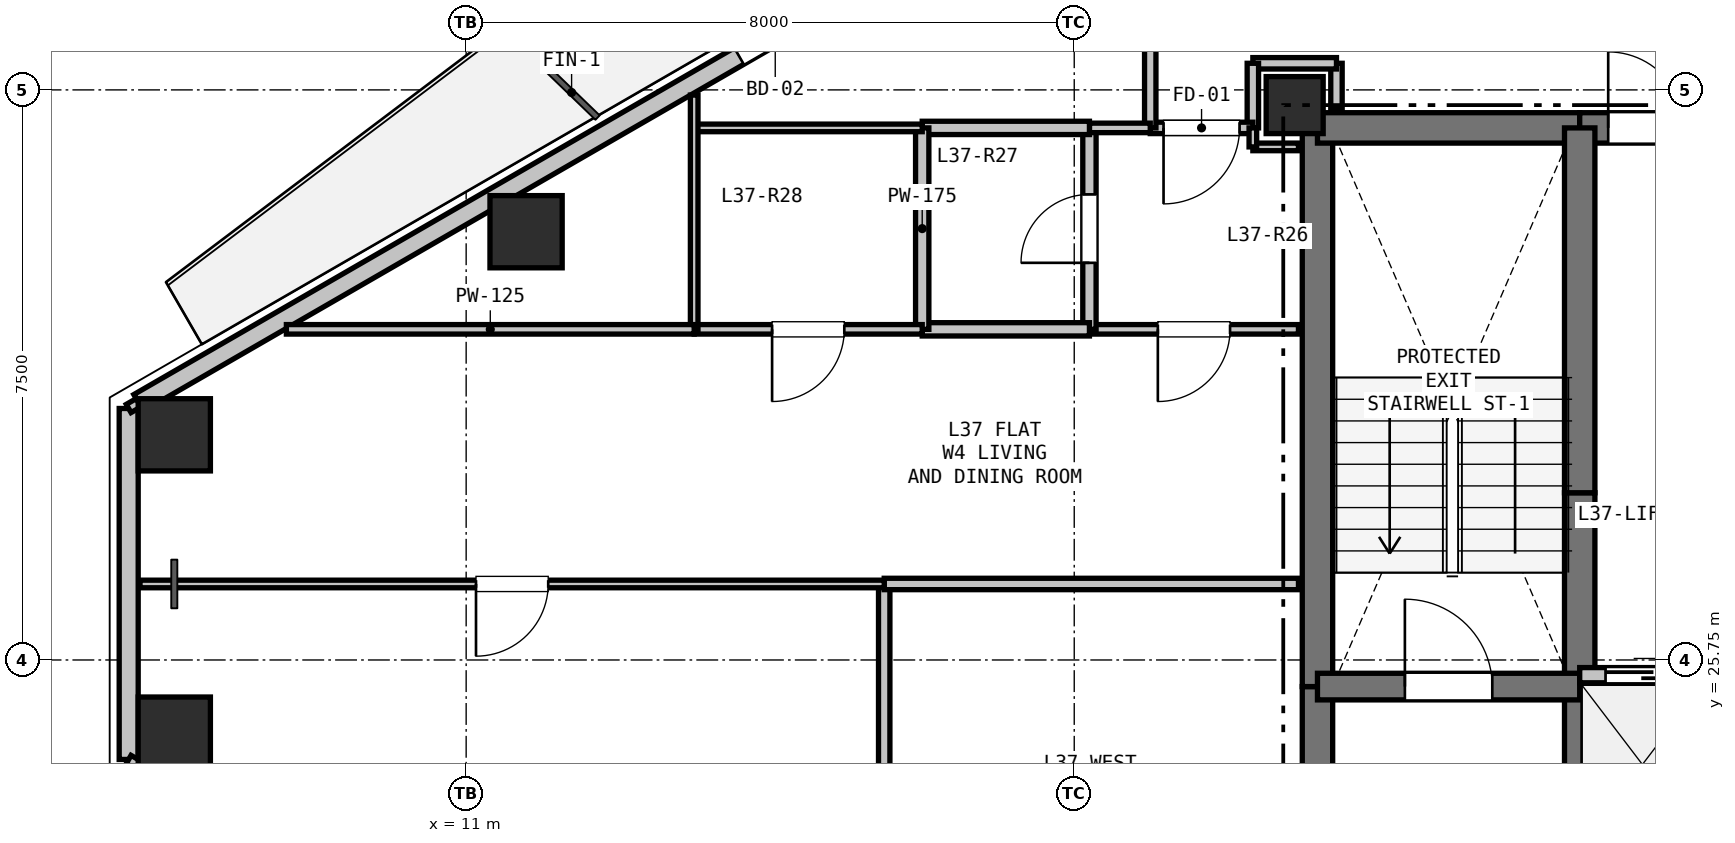
"""IFC4 building model, lengths in metres.
Left out: names, types, materials, properties, quantities, classifications, styles, units other than length and angle.
Written with IfcOpenShell. Run it as: python <this file> out.ifc"""

import sys

from ifc_helpers import new_model, si_unit, direction, frame, frame_2d, origin, origin_2d, place, context, subcontext, project, spatial, rectangle, hollow_rectangle, extrude, element, fill, save


model = new_model("IFC4")
c1 = context("Model", 3, precision=1e-05, world=origin(), true_north=direction((0.0, 1.0)))
c2 = subcontext(c1, "Body", "Model", "MODEL_VIEW")
j1 = project(units=[si_unit("LENGTHUNIT", "METRE"), si_unit("PLANEANGLEUNIT", "RADIAN")], contexts=[c1])
p1 = place(None, origin())
s1 = spatial("IfcSite", under=j1, at=p1, CompositionType="ELEMENT")
p2 = place(p1, origin())
s2 = spatial("IfcBuilding", under=s1, at=p2, CompositionType="ELEMENT")
p3 = place(p2, frame((0.0, 0.0, 134.4)))
s3 = spatial("IfcBuildingStorey", under=s2, at=p3, CompositionType="ELEMENT", Elevation=134.4)
p4 = place(p3, frame((21.9, 33.05, 0.0), z_axis=(0.0, 0.0, 1.0), x_axis=(1.0, 0.0, 0.0)))
e1 = element("IfcColumn", 1, at=p4, inside=s3, PredefinedType="COLUMN", context=c2, shape_type="SweptSolid", body=[
    extrude(rectangle(XDim=0.75, YDim=0.75, at=origin_2d()), origin(), (0.0, 0.0, 1.0), 3.3),
])
for number, where, z_axis, x_axis in (
    (2, (7.16, 28.712, 0.0), (0.0, 0.0, 1.0), (1.0, 0.0, 0.0)),
    (3, (11.788, 31.384, 0.0), (0.0, 0.0, 1.0), (1.0, 0.0, 0.0)),
    (4, (7.16, 24.788, 0.0), (0.0, 0.0, 1.0), (1.0, 0.0, 0.0)),
):
    element("IfcColumn", number, at=place(p3, frame(where, z_axis=z_axis, x_axis=x_axis)), inside=s3, PredefinedType="COLUMN", context=c2, shape_type="SweptSolid", body=[
        extrude(hollow_rectangle(XDim=0.95, YDim=0.95, WallThickness=0.028, at=origin_2d()), origin(), (0.0, 0.0, 1.0), 3.3),
    ])
p5 = place(p3, frame((6.56, 24.441, 0.0), z_axis=(0.0, 0.0, 1.0), x_axis=(0.0, 1.0, 0.0)))
e5 = element("IfcWall", 5, at=p5, inside=s3, PredefinedType="SOLIDWALL", context=c2, shape_type="SweptSolid", body=[
    extrude(rectangle(XDim=4.617, YDim=0.25, at=frame_2d((2.309, 0.0))), origin(), (0.0, 0.0, 1.0), 2.68),
])
p6 = place(p3, frame((6.69, 29.134, 0.0), z_axis=(0.0, 0.0, 1.0), x_axis=(0.866027848477, 0.499995765644, 0.0)))
e6 = element("IfcWall", 6, at=p6, inside=s3, PredefinedType="SOLIDWALL", context=c2, shape_type="SweptSolid", body=[
    extrude(rectangle(XDim=11.186, YDim=0.25, at=frame_2d((5.593, 0.0))), origin(), (0.0, 0.0, 1.0), 2.68),
])
p7 = place(p6, frame((9.122, 0.0, 0.0)))
e7 = element("IfcOpeningElement", 7, at=p7, cuts=e6, PredefinedType="OPENING", context=c2, shape_type="SweptSolid", body=[
    extrude(rectangle(XDim=1.1, YDim=2.1, at=frame_2d((0.55, 1.05))), frame((0.0, 0.135, 0.0), z_axis=(0.0, -1.0, 0.0), x_axis=(1.0, 0.0, 0.0)), (0.0, 0.0, 1.0), 0.27),
])
p8 = place(p3, frame((16.378, 18.773, 0.0), z_axis=(0.0, 0.0, 1.0), x_axis=(-0.866027848477, 0.499995765644, 0.0)))
e8 = element("IfcWall", 8, at=p8, inside=s3, PredefinedType="SOLIDWALL", context=c2, shape_type="SweptSolid", body=[
    extrude(rectangle(XDim=11.186, YDim=0.25, at=frame_2d((5.593, 0.0))), origin(), (0.0, 0.0, 1.0), 2.68),
])
p9 = place(p8, frame((6.605, 0.0, 0.9)))
e9 = element("IfcOpeningElement", 9, at=p9, cuts=e8, PredefinedType="OPENING", context=c2, shape_type="SweptSolid", body=[
    extrude(rectangle(XDim=1.2, YDim=1.4, at=frame_2d((0.6, 0.7))), frame((0.0, 0.135, 0.0), z_axis=(0.0, -1.0, 0.0), x_axis=(1.0, 0.0, 0.0)), (0.0, 0.0, 1.0), 0.27),
])
p10 = place(p3, frame((22.2, 20.75, 0.0), z_axis=(0.0, 0.0, 1.0), x_axis=(0.0, 1.0, 0.0)))
e10 = element("IfcWall", 10, at=p10, inside=s3, PredefinedType="SHEAR", context=c2, shape_type="SweptSolid", body=[
    extrude(rectangle(XDim=4.65, YDim=0.4, at=frame_2d((2.325, 0.0))), origin(), (0.0, 0.0, 1.0), 3.06),
])
p11 = place(p3, frame((22.2, 25.4, 0.0), z_axis=(0.0, 0.0, 1.0), x_axis=(0.0, 1.0, 0.0)))
e11 = element("IfcWall", 11, at=p11, inside=s3, PredefinedType="SHEAR", context=c2, shape_type="SweptSolid", body=[
    extrude(rectangle(XDim=7.35, YDim=0.4, at=frame_2d((3.675, 0.0))), origin(), (0.0, 0.0, 1.0), 3.06),
])
p12 = place(p3, frame((22.2, 32.75, 0.0), z_axis=(0.0, 0.0, 1.0), x_axis=(1.0, 0.0, 0.0)))
e12 = element("IfcWall", 12, at=p12, inside=s3, PredefinedType="SHEAR", context=c2, shape_type="SweptSolid", body=[
    extrude(rectangle(XDim=3.45, YDim=0.4, at=frame_2d((1.725, 0.0))), origin(), (0.0, 0.0, 1.0), 3.06),
])
p13 = place(p3, frame((25.65, 32.75, 0.0), z_axis=(0.0, 0.0, 1.0), x_axis=(1.0, 0.0, 0.0)))
e13 = element("IfcWall", 13, at=p13, inside=s3, PredefinedType="SHEAR", context=c2, shape_type="SweptSolid", body=[
    extrude(rectangle(XDim=1.75, YDim=0.4, at=frame_2d((0.875, 0.0))), origin(), (0.0, 0.0, 1.0), 3.06),
])
p14 = place(p13, frame((0.375, 0.0, 0.0)))
e14 = element("IfcOpeningElement", 14, at=p14, cuts=e13, PredefinedType="OPENING", context=c2, shape_type="SweptSolid", body=[
    extrude(rectangle(XDim=1.0, YDim=2.15, at=frame_2d((0.5, 1.075))), frame((0.0, 0.21, 0.0), z_axis=(0.0, -1.0, 0.0), x_axis=(1.0, 0.0, 0.0)), (0.0, 0.0, 1.0), 0.42),
])
p15 = place(p3, frame((25.65, 22.75, 0.0), z_axis=(0.0, 0.0, 1.0), x_axis=(0.0, 1.0, 0.0)))
e15 = element("IfcWall", 15, at=p15, inside=s3, PredefinedType="SHEAR", context=c2, shape_type="SweptSolid", body=[
    extrude(rectangle(XDim=2.8, YDim=0.4, at=frame_2d((1.4, 0.0))), origin(), (0.0, 0.0, 1.0), 3.06),
])
p16 = place(p3, frame((25.65, 25.55, 0.0), z_axis=(0.0, 0.0, 1.0), x_axis=(0.0, 1.0, 0.0)))
e16 = element("IfcWall", 16, at=p16, inside=s3, PredefinedType="SHEAR", context=c2, shape_type="SweptSolid", body=[
    extrude(rectangle(XDim=2.4, YDim=0.4, at=frame_2d((1.2, 0.0))), origin(), (0.0, 0.0, 1.0), 3.06),
])
p17 = place(p3, frame((25.65, 27.95, 0.0), z_axis=(0.0, 0.0, 1.0), x_axis=(0.0, 1.0, 0.0)))
e17 = element("IfcWall", 17, at=p17, inside=s3, PredefinedType="SHEAR", context=c2, shape_type="SweptSolid", body=[
    extrude(rectangle(XDim=4.8, YDim=0.4, at=frame_2d((2.4, 0.0))), origin(), (0.0, 0.0, 1.0), 3.06),
])
p18 = place(p3, frame((22.2, 25.4, 0.0), z_axis=(0.0, 0.0, 1.0), x_axis=(1.0, 0.0, 0.0)))
e18 = element("IfcWall", 18, at=p18, inside=s3, PredefinedType="SHEAR", context=c2, shape_type="SweptSolid", body=[
    extrude(rectangle(XDim=3.45, YDim=0.35, at=frame_2d((1.725, 0.0))), origin(), (0.0, 0.0, 1.0), 3.06),
])
p19 = place(p18, frame((1.15, 0.0, 0.0)))
e19 = element("IfcOpeningElement", 19, at=p19, cuts=e18, PredefinedType="OPENING", context=c2, shape_type="SweptSolid", body=[
    extrude(rectangle(XDim=1.15, YDim=2.15, at=frame_2d((0.575, 1.075))), frame((0.0, 0.185, 0.0), z_axis=(0.0, -1.0, 0.0), x_axis=(1.0, 0.0, 0.0)), (0.0, 0.0, 1.0), 0.37),
])
p20 = place(p3, frame((25.65, 25.55, 0.0), z_axis=(0.0, 0.0, 1.0), x_axis=(1.0, 0.0, 0.0)))
e20 = element("IfcWall", 20, at=p20, inside=s3, PredefinedType="PARTITIONING", context=c2, shape_type="SweptSolid", body=[
    extrude(rectangle(XDim=4.95, YDim=0.2, at=frame_2d((2.475, 0.0))), origin(), (0.0, 0.0, 1.0), 3.06),
])
p21 = place(p20, frame((0.34, 0.0, 0.0)))
e21 = element("IfcOpeningElement", 21, at=p21, cuts=e20, PredefinedType="OPENING", context=c2, shape_type="SweptSolid", body=[
    extrude(rectangle(XDim=1.1, YDim=2.15, at=frame_2d((0.55, 1.075))), frame((0.0, 0.11, 0.0), z_axis=(0.0, -1.0, 0.0), x_axis=(1.0, 0.0, 0.0)), (0.0, 0.0, 1.0), 0.22),
])
p22 = place(p20, frame((1.99, 0.0, 0.0)))
e22 = element("IfcOpeningElement", 22, at=p22, cuts=e20, PredefinedType="OPENING", context=c2, shape_type="SweptSolid", body=[
    extrude(rectangle(XDim=1.1, YDim=2.15, at=frame_2d((0.55, 1.075))), frame((0.0, 0.11, 0.0), z_axis=(0.0, -1.0, 0.0), x_axis=(1.0, 0.0, 0.0)), (0.0, 0.0, 1.0), 0.22),
])
p23 = place(p20, frame((3.64, 0.0, 0.0)))
e23 = element("IfcOpeningElement", 23, at=p23, cuts=e20, PredefinedType="OPENING", context=c2, shape_type="SweptSolid", body=[
    extrude(rectangle(XDim=1.1, YDim=2.15, at=frame_2d((0.55, 1.075))), frame((0.0, 0.11, 0.0), z_axis=(0.0, -1.0, 0.0), x_axis=(1.0, 0.0, 0.0)), (0.0, 0.0, 1.0), 0.22),
])
p24 = place(p3, frame((22.45, 33.0, 0.0), z_axis=(0.0, 0.0, 1.0), x_axis=(0.0, 1.0, 0.0)))
e24 = element("IfcWall", 24, at=p24, inside=s3, PredefinedType="PARTITIONING", context=c2, shape_type="SweptSolid", body=[
    extrude(rectangle(XDim=0.6, YDim=0.15, at=frame_2d((0.3, 0.0))), origin(), (0.0, 0.0, 1.0), 2.508),
])
p25 = place(p3, frame((22.45, 33.6, 0.0), z_axis=(0.0, 0.0, 1.0), x_axis=(-1.0, 0.0, 0.0)))
e25 = element("IfcWall", 25, at=p25, inside=s3, PredefinedType="PARTITIONING", context=c2, shape_type="SweptSolid", body=[
    extrude(rectangle(XDim=1.1, YDim=0.15, at=frame_2d((0.55, 0.0))), origin(), (0.0, 0.0, 1.0), 3.06),
])
p26 = place(p3, frame((21.35, 33.6, 0.0), z_axis=(0.0, 0.0, 1.0), x_axis=(0.0, -1.0, 0.0)))
e26 = element("IfcWall", 26, at=p26, inside=s3, PredefinedType="PARTITIONING", context=c2, shape_type="SweptSolid", body=[
    extrude(rectangle(XDim=0.85, YDim=0.15, at=frame_2d((0.425, 0.0))), origin(), (0.0, 0.0, 1.0), 2.433),
])
p27 = place(p3, frame((21.35, 32.75, 0.0), z_axis=(0.0, 0.0, 1.0), x_axis=(-1.0, 0.0, 0.0)))
e27 = element("IfcWall", 27, at=p27, inside=s3, PredefinedType="PARTITIONING", context=c2, shape_type="SweptSolid", body=[
    extrude(rectangle(XDim=1.35, YDim=0.15, at=frame_2d((0.675, 0.0))), origin(), (0.0, 0.0, 1.0), 2.433),
])
p28 = place(p27, frame((0.175, 0.0, 0.0)))
e28 = element("IfcOpeningElement", 28, at=p28, cuts=e27, PredefinedType="OPENING", context=c2, shape_type="SweptSolid", body=[
    extrude(rectangle(XDim=1.0, YDim=2.15, at=frame_2d((0.5, 1.075))), frame((0.0, 0.085, 0.0), z_axis=(0.0, -1.0, 0.0), x_axis=(1.0, 0.0, 0.0)), (0.0, 0.0, 1.0), 0.17),
])
p29 = place(p3, frame((20.0, 32.75, 0.0), z_axis=(0.0, 0.0, 1.0), x_axis=(0.0, 1.0, 0.0)))
e29 = element("IfcWall", 29, at=p29, inside=s3, PredefinedType="PARTITIONING", context=c2, shape_type="SweptSolid", body=[
    extrude(rectangle(XDim=2.6, YDim=0.15, at=frame_2d((1.3, 0.0))), origin(), (0.0, 0.0, 1.0), 2.433),
])
p30 = place(p3, frame((21.35, 32.5, 0.0), z_axis=(0.0, 0.0, 1.0), x_axis=(1.0, 0.0, 0.0)))
e30 = element("IfcWall", 30, at=p30, inside=s3, PredefinedType="PARTITIONING", context=c2, shape_type="SweptSolid", body=[
    extrude(rectangle(XDim=0.6, YDim=0.1, at=frame_2d((0.3, 0.0))), origin(), (0.0, 0.0, 1.0), 2.508),
])
p31 = place(p3, frame((21.95, 30.1, 0.0), z_axis=(0.0, 0.0, 1.0), x_axis=(-1.0, 0.0, 0.0)))
e31 = element("IfcWall", 31, at=p31, inside=s3, PredefinedType="PARTITIONING", context=c2, shape_type="SweptSolid", body=[
    extrude(rectangle(XDim=2.75, YDim=0.125, at=frame_2d((1.375, 0.0))), origin(), (0.0, 0.0, 1.0), 2.508),
])
p32 = place(p31, frame((0.9, 0.0, 0.0)))
e32 = element("IfcOpeningElement", 32, at=p32, cuts=e31, PredefinedType="OPENING", context=c2, shape_type="SweptSolid", body=[
    extrude(rectangle(XDim=0.95, YDim=2.1, at=frame_2d((0.475, 1.05))), frame((0.0, 0.073, 0.0), z_axis=(0.0, -1.0, 0.0), x_axis=(1.0, 0.0, 0.0)), (0.0, 0.0, 1.0), 0.145),
])
p33 = place(p3, frame((19.2, 30.1, 0.0), z_axis=(0.0, 0.0, 1.0), x_axis=(0.0, 1.0, 0.0)))
e33 = element("IfcWall", 33, at=p33, inside=s3, PredefinedType="PLUMBINGWALL", context=c2, shape_type="SweptSolid", body=[
    extrude(rectangle(XDim=2.65, YDim=0.175, at=frame_2d((1.325, 0.0))), origin(), (0.0, 0.0, 1.0), 2.433),
])
p34 = place(p33, frame((0.875, 0.0, 0.0)))
e34 = element("IfcOpeningElement", 34, at=p34, cuts=e33, PredefinedType="OPENING", context=c2, shape_type="SweptSolid", body=[
    extrude(rectangle(XDim=0.9, YDim=2.1, at=frame_2d((0.45, 1.05))), frame((0.0, 0.097, 0.0), z_axis=(0.0, -1.0, 0.0), x_axis=(1.0, 0.0, 0.0)), (0.0, 0.0, 1.0), 0.195),
])
p35 = place(p3, frame((19.2, 32.75, 0.0), z_axis=(0.0, 0.0, 1.0), x_axis=(1.0, 0.0, 0.0)))
e35 = element("IfcWall", 35, at=p35, inside=s3, PredefinedType="PARTITIONING", context=c2, shape_type="SweptSolid", body=[
    extrude(rectangle(XDim=0.8, YDim=0.125, at=frame_2d((0.4, 0.0))), origin(), (0.0, 0.0, 1.0), 2.433),
])
p36 = place(p3, frame((21.35, 32.75, 0.0), z_axis=(0.0, 0.0, 1.0), x_axis=(0.0, -1.0, 0.0)))
e36 = element("IfcWall", 36, at=p36, inside=s3, PredefinedType="PARTITIONING", context=c2, shape_type="SweptSolid", body=[
    extrude(rectangle(XDim=0.25, YDim=0.1, at=frame_2d((0.125, 0.0))), origin(), (0.0, 0.0, 1.0), 3.06),
])
p37 = place(p3, frame((17.0, 32.75, 0.0), z_axis=(0.0, 0.0, 1.0), x_axis=(1.0, 0.0, 0.0)))
e37 = element("IfcWall", 37, at=p37, inside=s3, PredefinedType="PLUMBINGWALL", context=c2, shape_type="SweptSolid", body=[
    extrude(rectangle(XDim=2.2, YDim=0.175, at=frame_2d((1.1, 0.0))), origin(), (0.0, 0.0, 1.0), 2.433),
])
p38 = place(p3, frame((19.2, 30.1, 0.0), z_axis=(0.0, 0.0, 1.0), x_axis=(-1.0, 0.0, 0.0)))
e38 = element("IfcWall", 38, at=p38, inside=s3, PredefinedType="PLUMBINGWALL", context=c2, shape_type="SweptSolid", body=[
    extrude(rectangle(XDim=2.2, YDim=0.175, at=frame_2d((1.1, 0.0))), origin(), (0.0, 0.0, 1.0), 3.06),
])
p39 = place(p3, frame((17.0, 30.1, 0.0), z_axis=(0.0, 0.0, 1.0), x_axis=(0.0, 1.0, 0.0)))
e39 = element("IfcWall", 39, at=p39, inside=s3, PredefinedType="PLUMBINGWALL", context=c2, shape_type="SweptSolid", body=[
    extrude(rectangle(XDim=2.65, YDim=0.175, at=frame_2d((1.325, 0.0))), origin(), (0.0, 0.0, 1.0), 2.433),
])
p40 = place(p3, frame((14.0, 32.75, 0.0), z_axis=(0.0, 0.0, 1.0), x_axis=(1.0, 0.0, 0.0)))
e40 = element("IfcWall", 40, at=p40, inside=s3, PredefinedType="PARTITIONING", context=c2, shape_type="SweptSolid", body=[
    extrude(rectangle(XDim=3.0, YDim=0.1, at=frame_2d((1.5, 0.0))), origin(), (0.0, 0.0, 1.0), 2.365),
])
p41 = place(p3, frame((17.0, 30.1, 0.0), z_axis=(0.0, 0.0, 1.0), x_axis=(-1.0, 0.0, 0.0)))
e41 = element("IfcWall", 41, at=p41, inside=s3, PredefinedType="PARTITIONING", context=c2, shape_type="SweptSolid", body=[
    extrude(rectangle(XDim=3.0, YDim=0.125, at=frame_2d((1.5, 0.0))), origin(), (0.0, 0.0, 1.0), 3.06),
])
p42 = place(p41, frame((1.025, 0.0, 0.0)))
e42 = element("IfcOpeningElement", 42, at=p42, cuts=e41, PredefinedType="OPENING", context=c2, shape_type="SweptSolid", body=[
    extrude(rectangle(XDim=0.95, YDim=2.1, at=frame_2d((0.475, 1.05))), frame((0.0, 0.073, 0.0), z_axis=(0.0, -1.0, 0.0), x_axis=(1.0, 0.0, 0.0)), (0.0, 0.0, 1.0), 0.145),
])
p43 = place(p3, frame((14.0, 30.1, 0.0), z_axis=(0.0, 0.0, 1.0), x_axis=(0.0, 1.0, 0.0)))
e43 = element("IfcWall", 43, at=p43, inside=s3, PredefinedType="PARTITIONING", context=c2, shape_type="SweptSolid", body=[
    extrude(rectangle(XDim=3.082, YDim=0.1, at=frame_2d((1.541, 0.0))), origin(), (0.0, 0.0, 1.0), 2.365),
])
p44 = place(p3, frame((16.5, 20.75, 0.0), z_axis=(0.0, 0.0, 1.0), x_axis=(0.0, 1.0, 0.0)))
e44 = element("IfcWall", 44, at=p44, inside=s3, PredefinedType="PARTITIONING", context=c2, shape_type="SweptSolid", body=[
    extrude(rectangle(XDim=6.0, YDim=0.15, at=frame_2d((3.0, 0.0))), origin(), (0.0, 0.0, 1.0), 2.433),
])
p45 = place(p3, frame((16.5, 26.75, 0.0), z_axis=(0.0, 0.0, 1.0), x_axis=(1.0, 0.0, 0.0)))
e45 = element("IfcWall", 45, at=p45, inside=s3, PredefinedType="PARTITIONING", context=c2, shape_type="SweptSolid", body=[
    extrude(rectangle(XDim=5.45, YDim=0.15, at=frame_2d((2.725, 0.0))), origin(), (0.0, 0.0, 1.0), 2.508),
])
p46 = place(p3, frame((8.635, 30.1, 0.0), z_axis=(0.0, 0.0, 1.0), x_axis=(1.0, 0.0, 0.0)))
e46 = element("IfcWall", 46, at=p46, inside=s3, PredefinedType="PARTITIONING", context=c2, shape_type="SweptSolid", body=[
    extrude(rectangle(XDim=5.365, YDim=0.125, at=frame_2d((2.683, 0.0))), origin(), (0.0, 0.0, 1.0), 2.725),
])
p47 = place(p3, frame((16.5, 26.75, 0.0), z_axis=(0.0, 0.0, 1.0), x_axis=(-1.0, 0.0, 0.0)))
e47 = element("IfcWall", 47, at=p47, inside=s3, PredefinedType="PARTITIONING", context=c2, shape_type="SweptSolid", body=[
    extrude(rectangle(XDim=9.791, YDim=0.1, at=frame_2d((4.896, 0.0))), origin(), (0.0, 0.0, 1.0), 2.725),
])
p48 = place(p47, frame((4.42, 0.0, 0.0)))
e48 = element("IfcOpeningElement", 48, at=p48, cuts=e47, PredefinedType="OPENING", context=c2, shape_type="SweptSolid", body=[
    extrude(rectangle(XDim=0.95, YDim=2.1, at=frame_2d((0.475, 1.05))), frame((0.0, 0.06, 0.0), z_axis=(0.0, -1.0, 0.0), x_axis=(1.0, 0.0, 0.0)), (0.0, 0.0, 1.0), 0.12),
])
for number, where, z_axis, x_axis in (
    (49, (6.56, 29.059, 0.0), (0.0, 0.0, 1.0), (0.866, 0.5, 0.0)),
    (50, (6.69, 24.366, 0.0), (0.0, 0.0, 1.0), (-0.866, 0.5, 0.0)),
):
    element("IfcWall", number, at=place(p3, frame(where, z_axis=z_axis, x_axis=x_axis)), inside=s3, PredefinedType="PARTITIONING", context=c2, shape_type="SweptSolid", body=[
        extrude(rectangle(XDim=0.15, YDim=0.125, at=frame_2d((0.075, 0.0))), origin(), (0.0, 0.0, 1.0), 3.06),
    ])
p49 = place(p7, origin())
e51 = element("IfcDoor", 51, at=p49, inside=s3, OperationType="SINGLE_SWING_RIGHT", PredefinedType="DOOR", context=c2, shape_type="SweptSolid", body=[
    extrude(rectangle(XDim=1.1, YDim=2.1, at=frame_2d((0.55, 1.05))), frame((0.0, 0.025, 0.0), z_axis=(0.0, -1.0, 0.0), x_axis=(1.0, 0.0, 0.0)), (0.0, 0.0, 1.0), 0.05),
])
fill(e7, e51)
p50 = place(p21, origin())
e52 = element("IfcDoor", 52, at=p50, inside=s3, OperationType="SLIDING_TO_LEFT", PredefinedType="DOOR", context=c2, shape_type="SweptSolid", body=[
    extrude(rectangle(XDim=1.1, YDim=2.15, at=frame_2d((0.55, 1.075))), frame((0.0, 0.025, 0.0), z_axis=(0.0, -1.0, 0.0), x_axis=(1.0, 0.0, 0.0)), (0.0, 0.0, 1.0), 0.05),
])
fill(e21, e52)
p51 = place(p14, origin())
e53 = element("IfcDoor", 53, at=p51, inside=s3, OperationType="SINGLE_SWING_LEFT", PredefinedType="DOOR", context=c2, shape_type="SweptSolid", body=[
    extrude(rectangle(XDim=1.0, YDim=2.15, at=frame_2d((0.5, 1.075))), frame((0.0, 0.025, 0.0), z_axis=(0.0, -1.0, 0.0), x_axis=(1.0, 0.0, 0.0)), (0.0, 0.0, 1.0), 0.05),
])
fill(e14, e53)
p52 = place(p19, origin())
e54 = element("IfcDoor", 54, at=p52, inside=s3, OperationType="SINGLE_SWING_LEFT", PredefinedType="DOOR", context=c2, shape_type="SweptSolid", body=[
    extrude(rectangle(XDim=1.15, YDim=2.15, at=frame_2d((0.575, 1.075))), frame((0.0, 0.025, 0.0), z_axis=(0.0, -1.0, 0.0), x_axis=(1.0, 0.0, 0.0)), (0.0, 0.0, 1.0), 0.05),
])
fill(e19, e54)
p53 = place(p28, origin())
e55 = element("IfcDoor", 55, at=p53, inside=s3, OperationType="SINGLE_SWING_RIGHT", PredefinedType="DOOR", context=c2, shape_type="SweptSolid", body=[
    extrude(rectangle(XDim=1.0, YDim=2.15, at=frame_2d((0.5, 1.075))), frame((0.0, 0.025, 0.0), z_axis=(0.0, -1.0, 0.0), x_axis=(1.0, 0.0, 0.0)), (0.0, 0.0, 1.0), 0.05),
])
fill(e28, e55)
p54 = place(p34, origin())
e56 = element("IfcDoor", 56, at=p54, inside=s3, OperationType="SINGLE_SWING_LEFT", PredefinedType="DOOR", context=c2, shape_type="SweptSolid", body=[
    extrude(rectangle(XDim=0.9, YDim=2.1, at=frame_2d((0.45, 1.05))), frame((0.0, 0.025, 0.0), z_axis=(0.0, -1.0, 0.0), x_axis=(1.0, 0.0, 0.0)), (0.0, 0.0, 1.0), 0.05),
])
fill(e34, e56)
p55 = place(p32, origin())
e57 = element("IfcDoor", 57, at=p55, inside=s3, OperationType="SINGLE_SWING_RIGHT", PredefinedType="DOOR", context=c2, shape_type="SweptSolid", body=[
    extrude(rectangle(XDim=0.95, YDim=2.1, at=frame_2d((0.475, 1.05))), frame((0.0, 0.025, 0.0), z_axis=(0.0, -1.0, 0.0), x_axis=(1.0, 0.0, 0.0)), (0.0, 0.0, 1.0), 0.05),
])
fill(e32, e57)
p56 = place(p42, origin())
e58 = element("IfcDoor", 58, at=p56, inside=s3, OperationType="SINGLE_SWING_RIGHT", PredefinedType="DOOR", context=c2, shape_type="SweptSolid", body=[
    extrude(rectangle(XDim=0.95, YDim=2.1, at=frame_2d((0.475, 1.05))), frame((0.0, 0.025, 0.0), z_axis=(0.0, -1.0, 0.0), x_axis=(1.0, 0.0, 0.0)), (0.0, 0.0, 1.0), 0.05),
])
fill(e42, e58)
p57 = place(p48, origin())
e59 = element("IfcDoor", 59, at=p57, inside=s3, OperationType="SINGLE_SWING_RIGHT", PredefinedType="DOOR", context=c2, shape_type="SweptSolid", body=[
    extrude(rectangle(XDim=0.95, YDim=2.1, at=frame_2d((0.475, 1.05))), frame((0.0, 0.025, 0.0), z_axis=(0.0, -1.0, 0.0), x_axis=(1.0, 0.0, 0.0)), (0.0, 0.0, 1.0), 0.05),
])
fill(e48, e59)
save(model, sys.argv[1])
